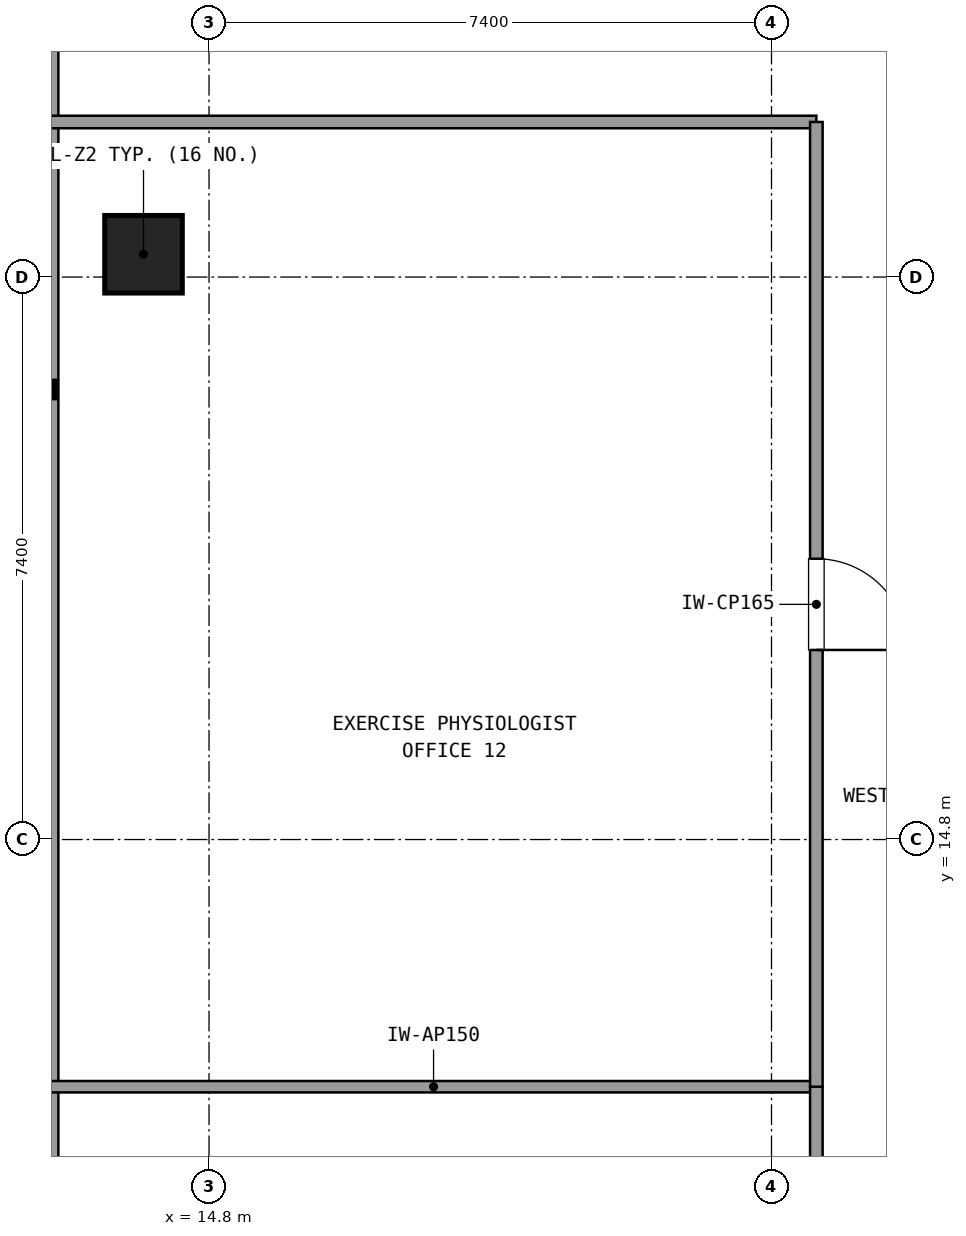
"""IFC4 building model, lengths in metres.
Left out: names, types, materials, properties, quantities, classifications, styles, units other than length and angle.
Written with IfcOpenShell. Run it as: python <this file> out.ifc"""

import sys

from ifc_helpers import new_model, si_unit, direction, frame, frame_2d, origin, origin_2d, place, context, subcontext, project, spatial, rectangle, extrude, element, fill, save


model = new_model("IFC4")
c1 = context("Model", 3, precision=1e-05, world=origin(), true_north=direction((0.0, 1.0)))
c2 = subcontext(c1, "Body", "Model", "MODEL_VIEW")
j1 = project(units=[si_unit("LENGTHUNIT", "METRE"), si_unit("PLANEANGLEUNIT", "RADIAN")], contexts=[c1])
p1 = place(None, origin())
s1 = spatial("IfcSite", under=j1, at=p1, CompositionType="ELEMENT")
p2 = place(p1, origin())
s2 = spatial("IfcBuilding", under=s1, at=p2, CompositionType="ELEMENT")
p3 = place(p2, frame((0.0, 0.0, 117.18)))
s3 = spatial("IfcBuildingStorey", under=s2, at=p3, CompositionType="ELEMENT", Elevation=117.18)
p4 = place(p3, frame((13.938, 22.5, 0.021), z_axis=(0.084573087246, 0.0, 0.99641727851), x_axis=(0.0, 1.0, 0.0)))
e1 = element("IfcColumn", 1, at=p4, inside=s3, PredefinedType="COLUMN", context=c2, shape_type="SweptSolid", body=[
    extrude(rectangle(XDim=1.02, YDim=1.02, at=origin_2d()), origin(), (0.0, 0.0, 1.0), 3.571),
])
p5 = place(p3, frame((12.698, 41.437, 0.0), z_axis=(0.0, 0.0, 1.0), x_axis=(0.0, -1.0, 0.0)))
e2 = element("IfcWall", 2, at=p5, inside=s3, PredefinedType="SOLIDWALL", context=c2, shape_type="SweptSolid", body=[
    extrude(rectangle(XDim=31.074, YDim=0.24, at=frame_2d((15.537, 0.0))), origin(), (0.0, 0.0, 1.0), 0.85),
])
p6 = place(p3, frame((12.718, 24.24, 0.0), z_axis=(0.0, 0.0, 1.0), x_axis=(1.0, 0.0, 0.0)))
e3 = element("IfcWall", 3, at=p6, inside=s3, PredefinedType="PARTITIONING", context=c2, shape_type="SweptSolid", body=[
    extrude(rectangle(XDim=10.072, YDim=0.165, at=frame_2d((5.036, 0.0))), origin(), (0.0, 0.0, 1.0), 2.61),
])
p7 = place(p3, frame((22.79, 11.548, 0.0), z_axis=(0.0, 0.0, 1.0), x_axis=(-1.0, 0.0, 0.0)))
e4 = element("IfcWall", 4, at=p7, inside=s3, PredefinedType="PARTITIONING", context=c2, shape_type="SweptSolid", body=[
    extrude(rectangle(XDim=10.072, YDim=0.15, at=frame_2d((5.036, 0.0))), origin(), (0.0, 0.0, 1.0), 2.61),
])
p8 = place(p3, frame((22.79, 4.408, 0.0), z_axis=(0.0, 0.0, 1.0), x_axis=(0.0, 1.0, 0.0)))
e5 = element("IfcWall", 5, at=p8, inside=s3, PredefinedType="PARTITIONING", context=c2, shape_type="SweptSolid", body=[
    extrude(rectangle(XDim=7.14, YDim=0.165, at=frame_2d((3.57, 0.0))), origin(), (0.0, 0.0, 1.0), 2.61),
])
p9 = place(p8, frame((2.97, 0.0, 0.0)))
e6 = element("IfcOpeningElement", 6, at=p9, cuts=e5, PredefinedType="OPENING", context=c2, shape_type="SweptSolid", body=[
    extrude(rectangle(XDim=1.2, YDim=2.15, at=frame_2d((0.6, 1.075))), frame((0.0, 0.093, 0.0), z_axis=(0.0, -1.0, 0.0), x_axis=(1.0, 0.0, 0.0)), (0.0, 0.0, 1.0), 0.185),
])
p10 = place(p3, frame((22.79, 11.548, 0.0), z_axis=(0.0, 0.0, 1.0), x_axis=(0.0, 1.0, 0.0)))
e7 = element("IfcWall", 7, at=p10, inside=s3, PredefinedType="PARTITIONING", context=c2, shape_type="SweptSolid", body=[
    extrude(rectangle(XDim=12.692, YDim=0.165, at=frame_2d((6.346, 0.0))), origin(), (0.0, 0.0, 1.0), 2.61),
])
p11 = place(p10, frame((5.746, 0.0, 0.0)))
e8 = element("IfcOpeningElement", 8, at=p11, cuts=e7, PredefinedType="OPENING", context=c2, shape_type="SweptSolid", body=[
    extrude(rectangle(XDim=1.2, YDim=2.15, at=frame_2d((0.6, 1.075))), frame((0.0, 0.093, 0.0), z_axis=(0.0, -1.0, 0.0), x_axis=(1.0, 0.0, 0.0)), (0.0, 0.0, 1.0), 0.185),
])
p12 = place(p11, frame((1.2, 0.0, 0.0), z_axis=(0.0, 0.0, 1.0), x_axis=(-1.0, 0.0, 0.0)))
e9 = element("IfcDoor", 9, at=p12, inside=s3, OperationType="SINGLE_SWING_LEFT", PredefinedType="DOOR", context=c2, shape_type="SweptSolid", body=[
    extrude(rectangle(XDim=1.2, YDim=2.15, at=frame_2d((0.6, 1.075))), frame((0.0, 0.025, 0.0), z_axis=(0.0, -1.0, 0.0), x_axis=(1.0, 0.0, 0.0)), (0.0, 0.0, 1.0), 0.05),
])
fill(e8, e9)
save(model, sys.argv[1])
